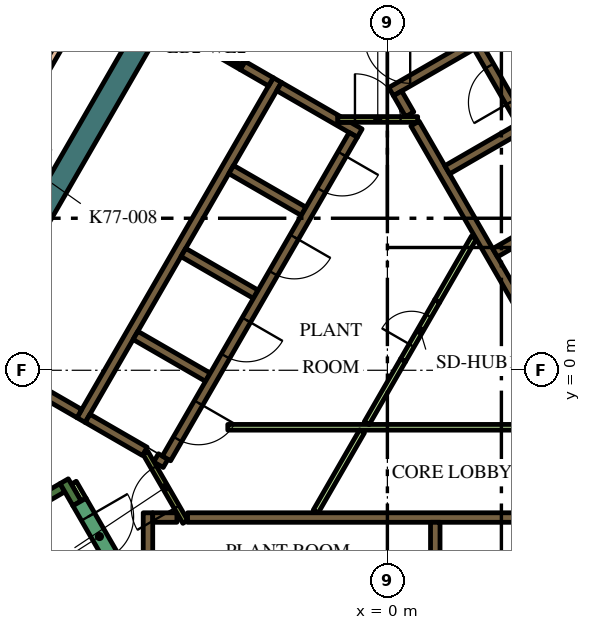
"""IFC4 building model, lengths in metres.
Left out: names, types, materials, properties, quantities, classifications, styles, units other than length and angle.
Written with IfcOpenShell. Run it as: python <this file> out.ifc"""

import sys

from ifc_helpers import new_model, si_unit, direction, frame, frame_2d, origin, place, context, subcontext, project, spatial, polyline, rectangle, outline, extrude, element, fill, save


model = new_model("IFC4")
c1 = context("Model", 3, precision=1e-05, world=origin(), true_north=direction((0.0, 1.0)))
c2 = subcontext(c1, "Body", "Model", "MODEL_VIEW")
j1 = project(units=[si_unit("LENGTHUNIT", "METRE"), si_unit("PLANEANGLEUNIT", "RADIAN")], contexts=[c1])
p1 = place(None, origin())
s1 = spatial("IfcSite", under=j1, at=p1, CompositionType="ELEMENT")
p2 = place(p1, origin())
s2 = spatial("IfcBuilding", under=s1, at=p2, CompositionType="ELEMENT")
p3 = place(p2, frame((0.0, 0.0, 331.8)))
s3 = spatial("IfcBuildingStorey", under=s2, at=p3, CompositionType="ELEMENT", Elevation=331.8)
p4 = place(p3, frame((1.989, 16.456, 0.0), z_axis=(0.0, 0.0, 1.0), x_axis=(0.49999102663, -0.8660305845, 0.0)))
e1 = element("IfcWall", 1, at=p4, inside=s3, PredefinedType="SOLIDWALL", context=c2, shape_type="SweptSolid", body=[
    extrude(rectangle(XDim=12.406, YDim=0.6, at=frame_2d((6.203, 0.0))), origin(), (0.0, 0.0, 1.0), 4.2),
])
p5 = place(p3, frame((-4.652, 11.842, 0.0), z_axis=(0.0, 0.0, 1.0), x_axis=(-0.500003640647, -0.866023301845, 0.0)))
e2 = element("IfcWall", 2, at=p5, inside=s3, PredefinedType="SOLIDWALL", context=c2, shape_type="SweptSolid", body=[
    extrude(rectangle(XDim=15.858, YDim=0.6, at=frame_2d((7.929, 0.0))), origin(), (0.0, 0.0, 1.0), 4.2),
])
p6 = place(p3, frame((-14.44, -6.49, 0.0), z_axis=(0.0, 0.0, 1.0), x_axis=(0.866022966069, 0.500004222222, 0.0)))
e3 = element("IfcWall", 3, at=p6, inside=s3, PredefinedType="SOLIDWALL", context=c2, shape_type="SweptSolid", body=[
    extrude(rectangle(XDim=6.8, YDim=0.25, at=frame_2d((3.4, 0.0))), origin(), (0.0, 0.0, 1.0), 4.2),
])
p7 = place(p3, frame((-8.168, -3.503, 0.0), z_axis=(0.0, 0.0, 1.0), x_axis=(-0.499952099219, 0.866053057547, 0.0)))
e4 = element("IfcWall", 4, at=p7, inside=s3, PredefinedType="SOLIDWALL", context=c2, shape_type="SweptSolid", body=[
    extrude(rectangle(XDim=0.675, YDim=0.25, at=frame_2d((0.337, 0.0))), origin(), (0.0, 0.0, 1.0), 4.2),
])
p8 = place(p3, frame((-5.259, -3.875, 0.0), z_axis=(0.0, 0.0, 1.0), x_axis=(1.0, 0.0, 0.0)))
e5 = element("IfcWall", 5, at=p8, inside=s3, PredefinedType="SOLIDWALL", context=c2, shape_type="SweptSolid", body=[
    extrude(rectangle(XDim=10.489, YDim=0.25, at=frame_2d((5.244, 0.0))), origin(), (0.0, 0.0, 1.0), 4.2),
])
p9 = place(p3, frame((1.26, -4.0, 0.0), z_axis=(0.0, 0.0, 1.0), x_axis=(0.0, -1.0, 0.0)))
e6 = element("IfcWall", 6, at=p9, inside=s3, PredefinedType="SOLIDWALL", context=c2, shape_type="SweptSolid", body=[
    extrude(rectangle(XDim=2.2, YDim=0.25, at=frame_2d((1.1, 0.0))), origin(), (0.0, 0.0, 1.0), 4.2),
])
p10 = place(p3, frame((-6.3, -7.125, 0.0), z_axis=(0.0, 0.0, 1.0), x_axis=(0.0, 1.0, 0.0)))
e7 = element("IfcWall", 7, at=p10, inside=s3, PredefinedType="SOLIDWALL", context=c2, shape_type="SweptSolid", body=[
    extrude(rectangle(XDim=3.375, YDim=0.25, at=frame_2d((1.687, 0.0))), origin(), (0.0, 0.0, 1.0), 4.2),
])
p11 = place(p3, frame((-6.175, -3.875, 0.0), z_axis=(0.0, 0.0, 1.0), x_axis=(1.0, 0.0, 0.0)))
e8 = element("IfcWall", 8, at=p11, inside=s3, PredefinedType="SOLIDWALL", context=c2, shape_type="SweptSolid", body=[
    extrude(rectangle(XDim=0.637, YDim=0.25, at=frame_2d((0.318, 0.0))), origin(), (0.0, 0.0, 1.0), 4.2),
])
p12 = place(p3, frame((3.1, 9.064, 0.0), z_axis=(0.0, 0.0, 1.0), x_axis=(-0.866033137035, -0.499986605379, 0.0)))
e9 = element("IfcWall", 9, at=p12, inside=s3, PredefinedType="SOLIDWALL", context=c2, shape_type="SweptSolid", body=[
    extrude(rectangle(XDim=3.467, YDim=0.25, at=frame_2d((1.733, 0.0))), origin(), (0.0, 0.0, 1.0), 4.2),
])
p13 = place(p3, frame((0.268, 7.285, 0.0), z_axis=(0.0, 0.0, 1.0), x_axis=(0.500098681536, -0.865968422476, 0.0)))
e10 = element("IfcWall", 10, at=p13, inside=s3, PredefinedType="SOLIDWALL", context=c2, shape_type="SweptSolid", body=[
    extrude(rectangle(XDim=0.636, YDim=0.25, at=frame_2d((0.318, 0.0))), origin(), (0.0, 0.0, 1.0), 4.2),
])
p14 = place(p3, frame((5.97, -2.591, 0.0), z_axis=(0.0, 0.0, 1.0), x_axis=(-0.499994469932, 0.866028596547, 0.0)))
e11 = element("IfcWall", 11, at=p14, inside=s3, PredefinedType="SOLIDWALL", context=c2, shape_type="SweptSolid", body=[
    extrude(rectangle(XDim=10.488, YDim=0.25, at=frame_2d((5.244, 0.0))), origin(), (0.0, 0.0, 1.0), 4.2),
])
p15 = place(p3, frame((1.574, 5.274, 0.0), z_axis=(0.0, 0.0, 1.0), x_axis=(0.866028486751, 0.499994660107, 0.0)))
e12 = element("IfcWall", 12, at=p15, inside=s3, PredefinedType="SOLIDWALL", context=c2, shape_type="SweptSolid", body=[
    extrude(rectangle(XDim=2.2, YDim=0.25, at=frame_2d((1.1, 0.0))), origin(), (0.0, 0.0, 1.0), 4.2),
])
p16 = place(p3, frame((2.834, 3.091, 0.0), z_axis=(0.0, 0.0, 1.0), x_axis=(0.866008176907, 0.50002983664, 0.0)))
e13 = element("IfcWall", 13, at=p16, inside=s3, PredefinedType="SOLIDWALL", context=c2, shape_type="SweptSolid", body=[
    extrude(rectangle(XDim=2.2, YDim=0.25, at=frame_2d((1.1, 0.0))), origin(), (0.0, 0.0, 1.0), 4.2),
])
p17 = place(p3, frame((-8.06, -1.311, 0.0), z_axis=(0.0, 0.0, 1.0), x_axis=(0.50000273126, 0.866023826885, 0.0)))
e14 = element("IfcWall", 14, at=p17, inside=s3, PredefinedType="SOLIDWALL", context=c2, shape_type="SweptSolid", body=[
    extrude(rectangle(XDim=10.33, YDim=0.25, at=frame_2d((5.165, 0.0))), origin(), (0.0, 0.0, 1.0), 4.2),
])
p18 = place(p3, origin())
e15 = element("IfcWall", 15, at=p18, inside=s3, PredefinedType="SOLIDWALL", context=c2, shape_type="SweptSolid", body=[
    extrude(outline(polyline([(-2.912, 7.356), (-2.787, 7.573), (-1.232, 6.675), (-1.303, 6.675), (-1.304, 6.675), (-1.304, 6.675), (-1.304, 6.525), (-1.304, 6.525), (-1.303, 6.525), (-0.971, 6.525), (-0.665, 6.348), (-0.79, 6.132), (-1.007, 6.257), (-1.007, 6.257), (-2.912, 7.356)])), origin(), (0.0, 0.0, 1.0), 4.2),
])
for number, where, z_axis, x_axis in (
    (16, (-2.204, 4.182, 0.0), (0.0, 0.0, 1.0), (-0.866, 0.5, 0.0)),
    (17, (-5.369, 3.1, 0.0), (0.0, 0.0, 1.0), (0.866, -0.5, 0.0)),
    (18, (-4.724, -0.182, 0.0), (0.0, 0.0, 1.0), (-0.866, 0.5, 0.0)),
):
    element("IfcWall", number, at=place(p3, frame(where, z_axis=z_axis, x_axis=x_axis)), inside=s3, PredefinedType="SOLIDWALL", context=c2, shape_type="SweptSolid", body=[
        extrude(rectangle(XDim=2.2, YDim=0.25, at=frame_2d((1.1, 0.0))), origin(), (0.0, 0.0, 1.0), 4.2),
    ])
p19 = place(p3, frame((-6.088, -2.305, 0.0), z_axis=(0.0, 0.0, 1.0), x_axis=(0.866059450854, -0.499941024108, 0.0)))
e19 = element("IfcWall", 19, at=p19, inside=s3, PredefinedType="SOLIDWALL", context=c2, shape_type="SweptSolid", body=[
    extrude(rectangle(XDim=0.29, YDim=0.25, at=frame_2d((0.145, 0.0))), origin(), (0.0, 0.0, 1.0), 4.2),
])
p20 = place(p3, frame((-7.889, -1.265, 0.0), z_axis=(0.0, 0.0, 1.0), x_axis=(0.865986741702, -0.500066958712, 0.0)))
e20 = element("IfcWall", 20, at=p20, inside=s3, PredefinedType="SOLIDWALL", context=c2, shape_type="SweptSolid", body=[
    extrude(rectangle(XDim=1.738, YDim=0.25, at=frame_2d((0.869, 0.0))), origin(), (0.0, 0.0, 1.0), 4.2),
])
p21 = place(p3, frame((-8.106, -1.14, 0.0), z_axis=(0.0, 0.0, 1.0), x_axis=(-0.866008981251, 0.500028443584, 0.0)))
e21 = element("IfcWall", 21, at=p21, inside=s3, PredefinedType="SOLIDWALL", context=c2, shape_type="SweptSolid", body=[
    extrude(rectangle(XDim=3.2, YDim=0.25, at=frame_2d((1.6, 0.0))), origin(), (0.0, 0.0, 1.0), 4.2),
])
p22 = place(p3, frame((-3.066, 7.59, 0.0), z_axis=(0.0, 0.0, 1.0), x_axis=(-0.866081358704, 0.49990307071, 0.0)))
e22 = element("IfcWall", 22, at=p22, inside=s3, PredefinedType="SOLIDWALL", context=c2, shape_type="SweptSolid", body=[
    extrude(rectangle(XDim=0.858, YDim=0.25, at=frame_2d((0.429, 0.0))), origin(), (0.0, 0.0, 1.0), 4.2),
])
e23 = element("IfcWall", 23, at=p18, inside=s3, PredefinedType="SOLIDWALL", context=c2, shape_type="SweptSolid", body=[
    extrude(outline(polyline([(-3.748, 8.128), (-3.813, 8.015), (-4.027, 8.139), (-4.017, 8.156), (-4.008, 8.173), (-4.0, 8.192), (-3.995, 8.21), (-3.991, 8.23), (-3.99, 8.25), (-3.99, 8.268), (-3.748, 8.128)])), origin(), (0.0, 0.0, 1.0), 4.2),
])
p23 = place(p3, frame((-8.252, -2.958, 0.0), z_axis=(0.0, 0.0, 1.0), x_axis=(0.500174715838, -0.865924508047, 0.0)))
e24 = element("IfcWall", 24, at=p23, inside=s3, PredefinedType="PARTITIONING", context=c2, shape_type="SweptSolid", body=[
    extrude(rectangle(XDim=0.514, YDim=0.15, at=frame_2d((0.257, 0.0))), origin(), (0.0, 0.0, 1.0), 3.45),
])
p24 = place(p3, frame((-4.2, -1.5, 0.0), z_axis=(0.0, 0.0, 1.0), x_axis=(1.0, 0.0, 0.0)))
e25 = element("IfcWall", 25, at=p24, inside=s3, PredefinedType="PARTITIONING", context=c2, shape_type="SweptSolid", body=[
    extrude(rectangle(XDim=9.359, YDim=0.15, at=frame_2d((4.68, 0.0))), origin(), (0.0, 0.0, 1.0), 3.45),
])
p25 = place(p3, frame((-0.544, -1.393, 0.0), z_axis=(0.0, 0.0, 1.0), x_axis=(0.499928740635, 0.866066541489, 0.0)))
e26 = element("IfcWall", 26, at=p25, inside=s3, PredefinedType="PARTITIONING", context=c2, shape_type="SweptSolid", body=[
    extrude(rectangle(XDim=1.912, YDim=0.15, at=frame_2d((0.956, 0.0))), origin(), (0.0, 0.0, 1.0), 3.45),
])
p26 = place(p3, frame((-0.668, -1.607, 0.0), z_axis=(0.0, 0.0, 1.0), x_axis=(-0.50003736129, -0.866003832159, 0.0)))
e27 = element("IfcWall", 27, at=p26, inside=s3, PredefinedType="PARTITIONING", context=c2, shape_type="SweptSolid", body=[
    extrude(rectangle(XDim=2.438, YDim=0.15, at=frame_2d((1.219, 0.0))), origin(), (0.0, 0.0, 1.0), 3.45),
])
p27 = place(p3, frame((1.312, 1.822, 0.0), z_axis=(0.0, 0.0, 1.0), x_axis=(0.500003549559, 0.866023354436, 0.0)))
e28 = element("IfcWall", 28, at=p27, inside=s3, PredefinedType="PARTITIONING", context=c2, shape_type="SweptSolid", body=[
    extrude(rectangle(XDim=1.93, YDim=0.15, at=frame_2d((0.965, 0.0))), origin(), (0.0, 0.0, 1.0), 3.45),
])
p28 = place(p3, frame((8.565, -2.185, 0.0), z_axis=(0.0, 0.0, 1.0), x_axis=(-0.499997954832, 0.866026584559, 0.0)))
e29 = element("IfcWall", 29, at=p28, inside=s3, PredefinedType="SOLIDWALL", context=c2, shape_type="SweptSolid", body=[
    extrude(rectangle(XDim=12.35, YDim=0.25, at=frame_2d((6.175, 0.0))), origin(), (0.0, 0.0, 1.0), 4.2),
])
p29 = place(p28, frame((0.685, 0.0, 0.0)))
e30 = element("IfcOpeningElement", 30, at=p29, cuts=e29, PredefinedType="OPENING", context=c2, shape_type="SweptSolid", body=[
    extrude(rectangle(XDim=0.9, YDim=2.1, at=frame_2d((0.45, 1.05))), frame((0.0, 0.135, 0.0), z_axis=(0.0, -1.0, 0.0), x_axis=(1.0, 0.0, 0.0)), (0.0, 0.0, 1.0), 0.27),
])
p30 = place(p28, frame((3.105, 0.0, 0.0)))
e31 = element("IfcOpeningElement", 31, at=p30, cuts=e29, PredefinedType="OPENING", context=c2, shape_type="SweptSolid", body=[
    extrude(rectangle(XDim=1.1, YDim=2.1, at=frame_2d((0.55, 1.05))), frame((0.0, 0.135, 0.0), z_axis=(0.0, -1.0, 0.0), x_axis=(1.0, 0.0, 0.0)), (0.0, 0.0, 1.0), 0.27),
])
p31 = place(p28, frame((5.625, 0.0, 0.0)))
e32 = element("IfcOpeningElement", 32, at=p31, cuts=e29, PredefinedType="OPENING", context=c2, shape_type="SweptSolid", body=[
    extrude(rectangle(XDim=1.1, YDim=2.1, at=frame_2d((0.55, 1.05))), frame((0.0, 0.135, 0.0), z_axis=(0.0, -1.0, 0.0), x_axis=(1.0, 0.0, 0.0)), (0.0, 0.0, 1.0), 0.27),
])
p32 = place(p28, frame((8.145, 0.0, 0.0)))
e33 = element("IfcOpeningElement", 33, at=p32, cuts=e29, PredefinedType="OPENING", context=c2, shape_type="SweptSolid", body=[
    extrude(rectangle(XDim=1.1, YDim=2.1, at=frame_2d((0.55, 1.05))), frame((0.0, 0.135, 0.0), z_axis=(0.0, -1.0, 0.0), x_axis=(1.0, 0.0, 0.0)), (0.0, 0.0, 1.0), 0.27),
])
p33 = place(p28, frame((10.665, 0.0, 0.0)))
e34 = element("IfcOpeningElement", 34, at=p33, cuts=e29, PredefinedType="OPENING", context=c2, shape_type="SweptSolid", body=[
    extrude(rectangle(XDim=1.1, YDim=2.1, at=frame_2d((0.55, 1.05))), frame((0.0, 0.135, 0.0), z_axis=(0.0, -1.0, 0.0), x_axis=(1.0, 0.0, 0.0)), (0.0, 0.0, 1.0), 0.27),
])
p34 = place(p3, frame((-0.898, 6.194, 0.0), z_axis=(0.0, 0.0, 1.0), x_axis=(-0.499996202215, -0.866027596426, 0.0)))
e35 = element("IfcWall", 35, at=p34, inside=s3, PredefinedType="SOLIDWALL", context=c2, shape_type="SweptSolid", body=[
    extrude(rectangle(XDim=9.83, YDim=0.25, at=frame_2d((4.915, 0.0))), origin(), (0.0, 0.0, 1.0), 4.2),
])
p35 = place(p34, frame((0.585, 0.0, 0.0)))
e36 = element("IfcOpeningElement", 36, at=p35, cuts=e35, PredefinedType="OPENING", context=c2, shape_type="SweptSolid", body=[
    extrude(rectangle(XDim=1.1, YDim=2.1, at=frame_2d((0.55, 1.05))), frame((0.0, 0.135, 0.0), z_axis=(0.0, -1.0, 0.0), x_axis=(1.0, 0.0, 0.0)), (0.0, 0.0, 1.0), 0.27),
])
p36 = place(p34, frame((3.105, 0.0, 0.0)))
e37 = element("IfcOpeningElement", 37, at=p36, cuts=e35, PredefinedType="OPENING", context=c2, shape_type="SweptSolid", body=[
    extrude(rectangle(XDim=1.1, YDim=2.1, at=frame_2d((0.55, 1.05))), frame((0.0, 0.135, 0.0), z_axis=(0.0, -1.0, 0.0), x_axis=(1.0, 0.0, 0.0)), (0.0, 0.0, 1.0), 0.27),
])
p37 = place(p34, frame((5.625, 0.0, 0.0)))
e38 = element("IfcOpeningElement", 38, at=p37, cuts=e35, PredefinedType="OPENING", context=c2, shape_type="SweptSolid", body=[
    extrude(rectangle(XDim=1.1, YDim=2.1, at=frame_2d((0.55, 1.05))), frame((0.0, 0.135, 0.0), z_axis=(0.0, -1.0, 0.0), x_axis=(1.0, 0.0, 0.0)), (0.0, 0.0, 1.0), 0.27),
])
p38 = place(p34, frame((8.145, 0.0, 0.0)))
e39 = element("IfcOpeningElement", 39, at=p38, cuts=e35, PredefinedType="OPENING", context=c2, shape_type="SweptSolid", body=[
    extrude(rectangle(XDim=1.1, YDim=2.1, at=frame_2d((0.55, 1.05))), frame((0.0, 0.135, 0.0), z_axis=(0.0, -1.0, 0.0), x_axis=(1.0, 0.0, 0.0)), (0.0, 0.0, 1.0), 0.27),
])
p39 = place(p3, frame((-8.103, -3.466, 0.0), z_axis=(0.0, 0.0, 1.0), x_axis=(0.500078061341, -0.865980330357, 0.0)))
e40 = element("IfcWall", 40, at=p39, inside=s3, PredefinedType="SOLIDWALL", context=c2, shape_type="SweptSolid", body=[
    extrude(rectangle(XDim=2.1, YDim=0.4, at=frame_2d((1.05, 0.0))), origin(), (0.0, 0.0, 1.0), 4.2),
])
p40 = place(p39, frame((0.45, 0.0, 0.0)))
e41 = element("IfcOpeningElement", 41, at=p40, cuts=e40, PredefinedType="OPENING", context=c2, shape_type="SweptSolid", body=[
    extrude(rectangle(XDim=1.2, YDim=2.1, at=frame_2d((0.6, 1.05))), frame((0.0, 0.21, 0.0), z_axis=(0.0, -1.0, 0.0), x_axis=(1.0, 0.0, 0.0)), (0.0, 0.0, 1.0), 0.42),
])
p41 = place(p3, frame((-1.303, 6.6, 0.0), z_axis=(0.0, 0.0, 1.0), x_axis=(1.0, 0.0, 0.0)))
e42 = element("IfcWall", 42, at=p41, inside=s3, PredefinedType="PARTITIONING", context=c2, shape_type="SweptSolid", body=[
    extrude(rectangle(XDim=2.1, YDim=0.15, at=frame_2d((1.05, 0.0))), origin(), (0.0, 0.0, 1.0), 4.2),
])
p42 = place(p41, frame((0.45, 0.0, 0.0)))
e43 = element("IfcOpeningElement", 43, at=p42, cuts=e42, PredefinedType="OPENING", context=c2, shape_type="SweptSolid", body=[
    extrude(rectangle(XDim=1.2, YDim=2.1, at=frame_2d((0.6, 1.05))), frame((0.0, 0.085, 0.0), z_axis=(0.0, -1.0, 0.0), x_axis=(1.0, 0.0, 0.0)), (0.0, 0.0, 1.0), 0.17),
])
p43 = place(p3, frame((-5.317, -3.99, 0.0), z_axis=(0.0, 0.0, 1.0), x_axis=(-0.500027713859, 0.866009402589, 0.0)))
e44 = element("IfcWall", 44, at=p43, inside=s3, PredefinedType="PARTITIONING", context=c2, shape_type="SweptSolid", body=[
    extrude(rectangle(XDim=2.1, YDim=0.15, at=frame_2d((1.05, 0.0))), origin(), (0.0, 0.0, 1.0), 4.2),
])
p44 = place(p43, frame((0.45, 0.0, 0.0)))
e45 = element("IfcOpeningElement", 45, at=p44, cuts=e44, PredefinedType="OPENING", context=c2, shape_type="SweptSolid", body=[
    extrude(rectangle(XDim=1.2, YDim=2.1, at=frame_2d((0.6, 1.05))), frame((0.0, 0.085, 0.0), z_axis=(0.0, -1.0, 0.0), x_axis=(1.0, 0.0, 0.0)), (0.0, 0.0, 1.0), 0.17),
])
p45 = place(p3, frame((-5.659, 9.012, 0.0), z_axis=(0.0, 0.0, 1.0), x_axis=(0.866009402589, -0.500027713859, 0.0)))
e46 = element("IfcWall", 46, at=p45, inside=s3, PredefinedType="PARTITIONING", context=c2, shape_type="SweptSolid", body=[
    extrude(rectangle(XDim=2.1, YDim=0.12, at=frame_2d((1.05, 0.0))), origin(), (0.0, 0.0, 1.0), 3.45),
])
p46 = place(p45, frame((0.45, 0.0, 0.0)))
e47 = element("IfcOpeningElement", 47, at=p46, cuts=e46, PredefinedType="OPENING", context=c2, shape_type="SweptSolid", body=[
    extrude(rectangle(XDim=1.2, YDim=2.1, at=frame_2d((0.6, 1.05))), frame((0.0, 0.07, 0.0), z_axis=(0.0, -1.0, 0.0), x_axis=(1.0, 0.0, 0.0)), (0.0, 0.0, 1.0), 0.14),
])
p47 = place(p3, frame((0.412, 0.263, 0.0), z_axis=(0.0, 0.0, 1.0), x_axis=(0.500062916607, 0.865989075817, 0.0)))
e48 = element("IfcWall", 48, at=p47, inside=s3, PredefinedType="PARTITIONING", context=c2, shape_type="SweptSolid", body=[
    extrude(rectangle(XDim=1.8, YDim=0.15, at=frame_2d((0.9, 0.0))), origin(), (0.0, 0.0, 1.0), 3.45),
])
p48 = place(p47, frame((0.45, 0.0, 0.0)))
e49 = element("IfcOpeningElement", 49, at=p48, cuts=e48, PredefinedType="OPENING", context=c2, shape_type="SweptSolid", body=[
    extrude(rectangle(XDim=0.9, YDim=2.1, at=frame_2d((0.45, 1.05))), frame((0.0, 0.085, 0.0), z_axis=(0.0, -1.0, 0.0), x_axis=(1.0, 0.0, 0.0)), (0.0, 0.0, 1.0), 0.17),
])
p49 = place(p3, frame((-8.042, 9.57, 0.0), z_axis=(0.0, 0.0, 1.0), x_axis=(-0.499966798825, -0.866044571643, 0.0)))
e50 = element("IfcWall", 50, at=p49, inside=s3, PredefinedType="PARTITIONING", context=c2, shape_type="SweptSolid", body=[
    extrude(rectangle(XDim=8.534, YDim=0.2, at=frame_2d((4.267, 0.0))), origin(), (0.0, 0.0, 1.0), 3.45),
])
p50 = place(p49, frame((3.667, 0.0, 0.0)))
e51 = element("IfcOpeningElement", 51, at=p50, cuts=e50, PredefinedType="OPENING", context=c2, shape_type="SweptSolid", body=[
    extrude(rectangle(XDim=1.2, YDim=2.1, at=frame_2d((0.6, 1.05))), frame((0.0, 0.11, 0.0), z_axis=(0.0, -1.0, 0.0), x_axis=(1.0, 0.0, 0.0)), (0.0, 0.0, 1.0), 0.22),
])
p51 = place(p3, frame((-7.54, 16.64, 0.0), z_axis=(0.0, 0.0, 1.0), x_axis=(-0.500002158106, -0.866024157798, 0.0)))
e52 = element("IfcWall", 52, at=p51, inside=s3, PredefinedType="SOLIDWALL", context=c2, shape_type="SweptSolid", body=[
    extrude(rectangle(XDim=21.282, YDim=0.3, at=frame_2d((10.641, 0.0))), origin(), (0.0, 0.0, 1.0), 3.45),
])
p52 = place(p33, origin())
e53 = element("IfcDoor", 53, at=p52, inside=s3, OperationType="DOUBLE_DOOR_SLIDING", PredefinedType="DOOR", context=c2, shape_type="SweptSolid", body=[
    extrude(rectangle(XDim=1.1, YDim=2.1, at=frame_2d((0.55, 1.05))), frame((0.0, 0.025, 0.0), z_axis=(0.0, -1.0, 0.0), x_axis=(1.0, 0.0, 0.0)), (0.0, 0.0, 1.0), 0.05),
])
fill(e34, e53)
p53 = place(p35, origin())
e54 = element("IfcDoor", 54, at=p53, inside=s3, OperationType="DOUBLE_DOOR_SLIDING", PredefinedType="DOOR", context=c2, shape_type="SweptSolid", body=[
    extrude(rectangle(XDim=1.1, YDim=2.1, at=frame_2d((0.55, 1.05))), frame((0.0, 0.025, 0.0), z_axis=(0.0, -1.0, 0.0), x_axis=(1.0, 0.0, 0.0)), (0.0, 0.0, 1.0), 0.05),
])
fill(e36, e54)
p54 = place(p36, origin())
e55 = element("IfcDoor", 55, at=p54, inside=s3, OperationType="DOUBLE_DOOR_SLIDING", PredefinedType="DOOR", context=c2, shape_type="SweptSolid", body=[
    extrude(rectangle(XDim=1.1, YDim=2.1, at=frame_2d((0.55, 1.05))), frame((0.0, 0.025, 0.0), z_axis=(0.0, -1.0, 0.0), x_axis=(1.0, 0.0, 0.0)), (0.0, 0.0, 1.0), 0.05),
])
fill(e37, e55)
p55 = place(p37, origin())
e56 = element("IfcDoor", 56, at=p55, inside=s3, OperationType="DOUBLE_DOOR_SLIDING", PredefinedType="DOOR", context=c2, shape_type="SweptSolid", body=[
    extrude(rectangle(XDim=1.1, YDim=2.1, at=frame_2d((0.55, 1.05))), frame((0.0, 0.025, 0.0), z_axis=(0.0, -1.0, 0.0), x_axis=(1.0, 0.0, 0.0)), (0.0, 0.0, 1.0), 0.05),
])
fill(e38, e56)
p56 = place(p38, origin())
e57 = element("IfcDoor", 57, at=p56, inside=s3, OperationType="DOUBLE_DOOR_SLIDING", PredefinedType="DOOR", context=c2, shape_type="SweptSolid", body=[
    extrude(rectangle(XDim=1.1, YDim=2.1, at=frame_2d((0.55, 1.05))), frame((0.0, 0.025, 0.0), z_axis=(0.0, -1.0, 0.0), x_axis=(1.0, 0.0, 0.0)), (0.0, 0.0, 1.0), 0.05),
])
fill(e39, e57)
p57 = place(p40, origin())
e58 = element("IfcDoor", 58, at=p57, inside=s3, OperationType="SINGLE_SWING_LEFT", PredefinedType="DOOR", context=c2, shape_type="SweptSolid", body=[
    extrude(rectangle(XDim=1.2, YDim=2.1, at=frame_2d((0.6, 1.05))), frame((0.0, 0.025, 0.0), z_axis=(0.0, -1.0, 0.0), x_axis=(1.0, 0.0, 0.0)), (0.0, 0.0, 1.0), 0.05),
])
fill(e41, e58)
p58 = place(p42, origin())
e59 = element("IfcDoor", 59, at=p58, inside=s3, OperationType="SINGLE_SWING_LEFT", PredefinedType="DOOR", context=c2, shape_type="SweptSolid", body=[
    extrude(rectangle(XDim=1.2, YDim=2.1, at=frame_2d((0.6, 1.05))), frame((0.0, 0.025, 0.0), z_axis=(0.0, -1.0, 0.0), x_axis=(1.0, 0.0, 0.0)), (0.0, 0.0, 1.0), 0.05),
])
fill(e43, e59)
p59 = place(p44, origin())
e60 = element("IfcDoor", 60, at=p59, inside=s3, OperationType="SINGLE_SWING_LEFT", PredefinedType="DOOR", context=c2, shape_type="SweptSolid", body=[
    extrude(rectangle(XDim=1.2, YDim=2.1, at=frame_2d((0.6, 1.05))), frame((0.0, 0.025, 0.0), z_axis=(0.0, -1.0, 0.0), x_axis=(1.0, 0.0, 0.0)), (0.0, 0.0, 1.0), 0.05),
])
fill(e45, e60)
p60 = place(p46, origin())
e61 = element("IfcDoor", 61, at=p60, inside=s3, OperationType="SINGLE_SWING_LEFT", PredefinedType="DOOR", context=c2, shape_type="SweptSolid", body=[
    extrude(rectangle(XDim=1.2, YDim=2.1, at=frame_2d((0.6, 1.05))), frame((0.0, 0.025, 0.0), z_axis=(0.0, -1.0, 0.0), x_axis=(1.0, 0.0, 0.0)), (0.0, 0.0, 1.0), 0.05),
])
fill(e47, e61)
p61 = place(p48, origin())
e62 = element("IfcDoor", 62, at=p61, inside=s3, OperationType="SINGLE_SWING_LEFT", PredefinedType="DOOR", context=c2, shape_type="SweptSolid", body=[
    extrude(rectangle(XDim=0.9, YDim=2.1, at=frame_2d((0.45, 1.05))), frame((0.0, 0.025, 0.0), z_axis=(0.0, -1.0, 0.0), x_axis=(1.0, 0.0, 0.0)), (0.0, 0.0, 1.0), 0.05),
])
fill(e49, e62)
save(model, sys.argv[1])
